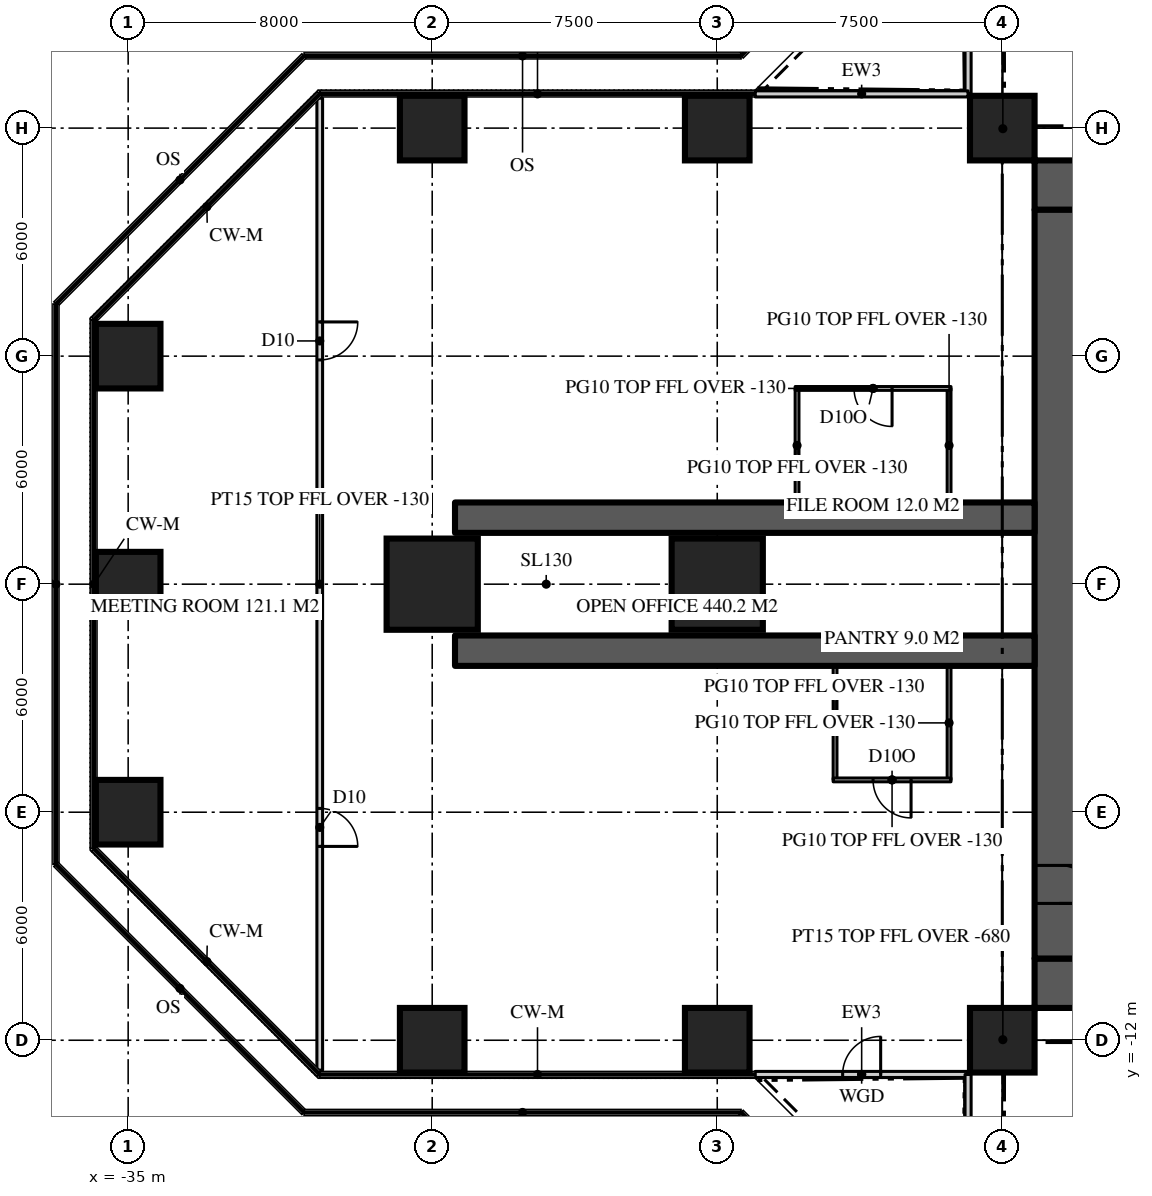
"""IFC4 building model, lengths in metres.
Left out: names, types, materials, properties, quantities, classifications, styles, units other than length and angle.
Written with IfcOpenShell. Run it as: python <this file> out.ifc"""

import sys

from ifc_helpers import new_model, si_unit, direction, frame, frame_2d, origin, origin_2d, place, context, subcontext, project, spatial, rectangle, extrude, element, fill, save


model = new_model("IFC4")
c1 = context("Model", 3, precision=1e-05, world=origin(), true_north=direction((0.0, 1.0)))
c2 = subcontext(c1, "Body", "Model", "MODEL_VIEW")
j1 = project(units=[si_unit("LENGTHUNIT", "METRE"), si_unit("PLANEANGLEUNIT", "RADIAN")], contexts=[c1])
p1 = place(None, origin())
s1 = spatial("IfcSite", under=j1, at=p1, CompositionType="ELEMENT")
p2 = place(p1, origin())
s2 = spatial("IfcBuilding", under=s1, at=p2, CompositionType="ELEMENT")
p3 = place(p2, frame((0.0, 0.0, 132.0)))
s3 = spatial("IfcBuildingStorey", under=s2, at=p3, CompositionType="ELEMENT", Elevation=132.0)
p4 = place(p3, frame((-11.15, 10.5, 0.0), z_axis=(0.0, 0.0, 1.0), x_axis=(1.0, 0.0, 0.0)))
e1 = element("IfcWall", 1, at=p4, inside=s3, PredefinedType="SHEAR", context=c2, shape_type="SweptSolid", body=[
    extrude(rectangle(XDim=22.3, YDim=1.3, at=frame_2d((11.15, 0.0))), origin(), (0.0, 0.0, 1.0), 3.9),
])
p5 = place(p4, frame((4.25, 0.0, 0.0)))
e2 = element("IfcOpeningElement", 2, at=p5, cuts=e1, PredefinedType="OPENING", context=c2, shape_type="SweptSolid", body=[
    extrude(rectangle(XDim=1.8, YDim=2.2, at=frame_2d((0.9, 1.1))), frame((0.0, 0.66, 0.0), z_axis=(0.0, -1.0, 0.0), x_axis=(1.0, 0.0, 0.0)), (0.0, 0.0, 1.0), 1.32),
])
p6 = place(p4, frame((16.25, 0.0, 0.0)))
e3 = element("IfcOpeningElement", 3, at=p6, cuts=e1, PredefinedType="OPENING", context=c2, shape_type="SweptSolid", body=[
    extrude(rectangle(XDim=1.8, YDim=2.2, at=frame_2d((0.9, 1.1))), frame((0.0, 0.66, 0.0), z_axis=(0.0, -1.0, 0.0), x_axis=(1.0, 0.0, 0.0)), (0.0, 0.0, 1.0), 1.32),
])
p7 = place(p3, frame((11.15, -10.5, 0.0), z_axis=(0.0, 0.0, 1.0), x_axis=(-1.0, 0.0, 0.0)))
e4 = element("IfcWall", 4, at=p7, inside=s3, PredefinedType="SHEAR", context=c2, shape_type="SweptSolid", body=[
    extrude(rectangle(XDim=22.3, YDim=1.3, at=frame_2d((11.15, 0.0))), origin(), (0.0, 0.0, 1.0), 3.9),
])
p8 = place(p7, frame((16.25, 0.0, 0.0)))
e5 = element("IfcOpeningElement", 5, at=p8, cuts=e4, PredefinedType="OPENING", context=c2, shape_type="SweptSolid", body=[
    extrude(rectangle(XDim=1.8, YDim=2.2, at=frame_2d((0.9, 1.1))), frame((0.0, 0.66, 0.0), z_axis=(0.0, -1.0, 0.0), x_axis=(1.0, 0.0, 0.0)), (0.0, 0.0, 1.0), 1.32),
])
p9 = place(p7, frame((4.25, 0.0, 0.0)))
e6 = element("IfcOpeningElement", 6, at=p9, cuts=e4, PredefinedType="OPENING", context=c2, shape_type="SweptSolid", body=[
    extrude(rectangle(XDim=1.8, YDim=2.2, at=frame_2d((0.9, 1.1))), frame((0.0, 0.66, 0.0), z_axis=(0.0, -1.0, 0.0), x_axis=(1.0, 0.0, 0.0)), (0.0, 0.0, 1.0), 1.32),
])
p10 = place(p3, frame((-10.5, 9.85, 0.0), z_axis=(0.0, 0.0, 1.0), x_axis=(0.0, -1.0, 0.0)))
e7 = element("IfcWall", 7, at=p10, inside=s3, PredefinedType="SHEAR", context=c2, shape_type="SweptSolid", body=[
    extrude(rectangle(XDim=19.7, YDim=1.3, at=frame_2d((9.85, 0.0))), origin(), (0.0, 0.0, 1.0), 3.9),
])
p11 = place(p10, frame((17.25, 0.0, 0.0)))
e8 = element("IfcOpeningElement", 8, at=p11, cuts=e7, PredefinedType="OPENING", context=c2, shape_type="SweptSolid", body=[
    extrude(rectangle(XDim=1.0, YDim=2.2, at=frame_2d((0.5, 1.1))), frame((0.0, 0.66, 0.0), z_axis=(0.0, -1.0, 0.0), x_axis=(1.0, 0.0, 0.0)), (0.0, 0.0, 1.0), 1.32),
])
for number, where, z_axis, x_axis in (
    (9, (-11.15, 1.75, 0.0), (0.0, 0.0, 1.0), (-1.0, 0.0, 0.0)),
    (10, (-11.15, -1.75, 0.0), (0.0, 0.0, 1.0), (-1.0, 0.0, 0.0)),
):
    element("IfcWall", number, at=place(p3, frame(where, z_axis=z_axis, x_axis=x_axis)), inside=s3, PredefinedType="SHEAR", context=c2, shape_type="SweptSolid", body=[
        extrude(rectangle(XDim=15.25, YDim=0.8, at=frame_2d((7.625, 0.0))), origin(), (0.0, 0.0, 1.0), 3.9),
    ])
for number, where, z_axis, x_axis in (
    (11, (-27.0, -12.0, 0.0), (0.0, 0.0, 1.0), (1.0, 0.0, 0.0)),
    (12, (-19.5, -12.0, 0.0), (0.0, 0.0, 1.0), (1.0, 0.0, 0.0)),
    (13, (-12.0, -12.0, 0.0), (0.0, 0.0, 1.0), (1.0, 0.0, 0.0)),
    (14, (-35.0, -6.0, 0.0), (0.0, 0.0, 1.0), (1.0, 0.0, 0.0)),
    (15, (-35.0, 0.0, 0.0), (0.0, 0.0, 1.0), (1.0, 0.0, 0.0)),
):
    element("IfcColumn", number, at=place(p3, frame(where, z_axis=z_axis, x_axis=x_axis)), inside=s3, PredefinedType="COLUMN", context=c2, shape_type="SweptSolid", body=[
        extrude(rectangle(XDim=1.7, YDim=1.7, at=origin_2d()), origin(), (0.0, 0.0, 1.0), 3.9),
    ])
for number, where, z_axis, x_axis in (
    (16, (-27.0, 0.0, 0.0), (0.0, 0.0, 1.0), (1.0, 0.0, 0.0)),
    (17, (-19.5, 0.0, 0.0), (0.0, 0.0, 1.0), (1.0, 0.0, 0.0)),
):
    element("IfcColumn", number, at=place(p3, frame(where, z_axis=z_axis, x_axis=x_axis)), inside=s3, PredefinedType="COLUMN", context=c2, shape_type="SweptSolid", body=[
        extrude(rectangle(XDim=2.4, YDim=2.4, at=origin_2d()), origin(), (0.0, 0.0, 1.0), 3.9),
    ])
for number, where, z_axis, x_axis in (
    (18, (-35.0, 6.0, 0.0), (0.0, 0.0, 1.0), (1.0, 0.0, 0.0)),
    (19, (-27.0, 12.0, 0.0), (0.0, 0.0, 1.0), (1.0, 0.0, 0.0)),
    (20, (-19.5, 12.0, 0.0), (0.0, 0.0, 1.0), (1.0, 0.0, 0.0)),
    (21, (-12.0, 12.0, 0.0), (0.0, 0.0, 1.0), (1.0, 0.0, 0.0)),
):
    element("IfcColumn", number, at=place(p3, frame(where, z_axis=z_axis, x_axis=x_axis)), inside=s3, PredefinedType="COLUMN", context=c2, shape_type="SweptSolid", body=[
        extrude(rectangle(XDim=1.7, YDim=1.7, at=origin_2d()), origin(), (0.0, 0.0, 1.0), 3.9),
    ])
p12 = place(p3, frame((-12.9, 18.5, 0.0), z_axis=(0.0, 0.0, 1.0), x_axis=(0.0, -1.0, 0.0)))
e22 = element("IfcWall", 22, at=p12, inside=s3, PredefinedType="SOLIDWALL", context=c2, shape_type="SweptSolid", body=[
    extrude(rectangle(XDim=5.6, YDim=0.16, at=frame_2d((2.8, 0.0))), origin(), (0.0, 0.0, 1.0), 3.77),
])
p13 = place(p12, frame((2.3, 0.0, 0.0)))
e23 = element("IfcOpeningElement", 23, at=p13, cuts=e22, PredefinedType="OPENING", context=c2, shape_type="SweptSolid", body=[
    extrude(rectangle(XDim=1.0, YDim=2.2, at=frame_2d((0.5, 1.1))), frame((0.0, 0.09, 0.0), z_axis=(0.0, -1.0, 0.0), x_axis=(1.0, 0.0, 0.0)), (0.0, 0.0, 1.0), 0.18),
])
p14 = place(p3, frame((-12.9, 12.9, 0.0), z_axis=(0.0, 0.0, 1.0), x_axis=(-1.0, 0.0, 0.0)))
e24 = element("IfcWall", 24, at=p14, inside=s3, PredefinedType="SOLIDWALL", context=c2, shape_type="SweptSolid", body=[
    extrude(rectangle(XDim=5.6, YDim=0.16, at=frame_2d((2.8, 0.0))), origin(), (0.0, 0.0, 1.0), 3.77),
])
p15 = place(p3, frame((-18.5, -12.9, 0.0), z_axis=(0.0, 0.0, 1.0), x_axis=(1.0, 0.0, 0.0)))
e25 = element("IfcWall", 25, at=p15, inside=s3, PredefinedType="SOLIDWALL", context=c2, shape_type="SweptSolid", body=[
    extrude(rectangle(XDim=5.6, YDim=0.16, at=frame_2d((2.8, 0.0))), origin(), (0.0, 0.0, 1.0), 3.77),
])
p16 = place(p15, frame((2.3, 0.0, 0.0)))
e26 = element("IfcOpeningElement", 26, at=p16, cuts=e25, PredefinedType="OPENING", context=c2, shape_type="SweptSolid", body=[
    extrude(rectangle(XDim=1.0, YDim=2.2, at=frame_2d((0.5, 1.1))), frame((0.0, 0.09, 0.0), z_axis=(0.0, -1.0, 0.0), x_axis=(1.0, 0.0, 0.0)), (0.0, 0.0, 1.0), 0.18),
])
p17 = place(p3, frame((-12.9, -12.9, 0.0), z_axis=(0.0, 0.0, 1.0), x_axis=(0.0, -1.0, 0.0)))
e27 = element("IfcWall", 27, at=p17, inside=s3, PredefinedType="SOLIDWALL", context=c2, shape_type="SweptSolid", body=[
    extrude(rectangle(XDim=5.6, YDim=0.16, at=frame_2d((2.8, 0.0))), origin(), (0.0, 0.0, 1.0), 3.77),
])
p18 = place(p3, frame((-29.959, 12.786, 0.0), z_axis=(0.0, 0.0, 1.0), x_axis=(0.0, -1.0, 0.0)))
e28 = element("IfcWall", 28, at=p18, inside=s3, PredefinedType="PARTITIONING", context=c2, shape_type="SweptSolid", body=[
    extrude(rectangle(XDim=25.573, YDim=0.15, at=frame_2d((12.786, 0.0))), origin(), (0.0, 0.0, 1.0), 3.77),
])
p19 = place(p18, frame((18.687, 0.0, 0.0)))
e29 = element("IfcOpeningElement", 29, at=p19, cuts=e28, PredefinedType="OPENING", context=c2, shape_type="SweptSolid", body=[
    extrude(rectangle(XDim=1.0, YDim=2.2, at=frame_2d((0.5, 1.1))), frame((0.0, 0.085, 0.0), z_axis=(0.0, -1.0, 0.0), x_axis=(1.0, 0.0, 0.0)), (0.0, 0.0, 1.0), 0.17),
])
p20 = place(p18, frame((5.886, 0.0, 0.0)))
e30 = element("IfcOpeningElement", 30, at=p20, cuts=e28, PredefinedType="OPENING", context=c2, shape_type="SweptSolid", body=[
    extrude(rectangle(XDim=1.0, YDim=2.2, at=frame_2d((0.5, 1.1))), frame((0.0, 0.085, 0.0), z_axis=(0.0, -1.0, 0.0), x_axis=(1.0, 0.0, 0.0)), (0.0, 0.0, 1.0), 0.17),
])
for number, where, z_axis, x_axis in (
    (31, (-13.4, -2.15, 0.0), (0.0, 0.0, 1.0), (0.0, -1.0, 0.0)),
    (32, (-16.4, -2.15, 0.0), (0.0, 0.0, 1.0), (0.0, -1.0, 0.0)),
):
    element("IfcWall", number, at=place(p3, frame(where, z_axis=z_axis, x_axis=x_axis)), inside=s3, PredefinedType="PARTITIONING", context=c2, shape_type="SweptSolid", body=[
        extrude(rectangle(XDim=3.0, YDim=0.1, at=frame_2d((1.5, 0.0))), origin(), (0.0, 0.0, 1.0), 3.77),
    ])
p21 = place(p3, frame((-13.35, -5.15, 0.0), z_axis=(0.0, 0.0, 1.0), x_axis=(-1.0, 0.0, 0.0)))
e33 = element("IfcWall", 33, at=p21, inside=s3, PredefinedType="PARTITIONING", context=c2, shape_type="SweptSolid", body=[
    extrude(rectangle(XDim=3.1, YDim=0.1, at=frame_2d((1.55, 0.0))), origin(), (0.0, 0.0, 1.0), 3.77),
])
p22 = place(p21, frame((1.05, 0.0, 0.0)))
e34 = element("IfcOpeningElement", 34, at=p22, cuts=e33, PredefinedType="OPENING", context=c2, shape_type="SweptSolid", body=[
    extrude(rectangle(XDim=1.0, YDim=2.2, at=frame_2d((0.5, 1.1))), frame((0.0, 0.06, 0.0), z_axis=(0.0, -1.0, 0.0), x_axis=(1.0, 0.0, 0.0)), (0.0, 0.0, 1.0), 0.12),
])
for number, where, z_axis, x_axis in (
    (35, (-13.4, 2.15, 0.0), (0.0, 0.0, 1.0), (0.0, 1.0, 0.0)),
    (36, (-17.4, 2.15, 0.0), (0.0, 0.0, 1.0), (0.0, 1.0, 0.0)),
):
    element("IfcWall", number, at=place(p3, frame(where, z_axis=z_axis, x_axis=x_axis)), inside=s3, PredefinedType="PARTITIONING", context=c2, shape_type="SweptSolid", body=[
        extrude(rectangle(XDim=3.0, YDim=0.1, at=frame_2d((1.5, 0.0))), origin(), (0.0, 0.0, 1.0), 3.77),
    ])
p23 = place(p3, frame((-13.35, 5.15, 0.0), z_axis=(0.0, 0.0, 1.0), x_axis=(-1.0, 0.0, 0.0)))
e37 = element("IfcWall", 37, at=p23, inside=s3, PredefinedType="PARTITIONING", context=c2, shape_type="SweptSolid", body=[
    extrude(rectangle(XDim=4.1, YDim=0.1, at=frame_2d((2.05, 0.0))), origin(), (0.0, 0.0, 1.0), 3.77),
])
p24 = place(p23, frame((1.55, 0.0, 0.0)))
e38 = element("IfcOpeningElement", 38, at=p24, cuts=e37, PredefinedType="OPENING", context=c2, shape_type="SweptSolid", body=[
    extrude(rectangle(XDim=1.0, YDim=2.2, at=frame_2d((0.5, 1.1))), frame((0.0, 0.06, 0.0), z_axis=(0.0, -1.0, 0.0), x_axis=(1.0, 0.0, 0.0)), (0.0, 0.0, 1.0), 0.12),
])
for number, where, z_axis, x_axis in (
    (39, (-11.15, 11.15, 0.0), (0.0, 0.0, 1.0), (-0.707, 0.707, 0.0)),
    (40, (-11.15, -11.15, 0.0), (0.0, 0.0, 1.0), (-0.707, -0.707, 0.0)),
):
    element("IfcWall", number, at=place(p3, frame(where, z_axis=z_axis, x_axis=x_axis)), inside=s3, PredefinedType="PARTITIONING", context=c2, shape_type="SweptSolid", body=[
        extrude(rectangle(XDim=2.362, YDim=0.15, at=frame_2d((1.181, 0.0))), origin(), (0.0, 0.0, 1.0), 3.22),
    ])
p25 = place(p16, origin())
e41 = element("IfcDoor", 41, at=p25, inside=s3, OperationType="SINGLE_SWING_RIGHT", PredefinedType="DOOR", context=c2, shape_type="SweptSolid", body=[
    extrude(rectangle(XDim=1.0, YDim=2.2, at=frame_2d((0.5, 1.1))), frame((0.0, 0.025, 0.0), z_axis=(0.0, -1.0, 0.0), x_axis=(1.0, 0.0, 0.0)), (0.0, 0.0, 1.0), 0.05),
])
fill(e26, e41)
p26 = place(p11, origin())
e42 = element("IfcDoor", 42, at=p26, inside=s3, OperationType="SINGLE_SWING_RIGHT", PredefinedType="DOOR", context=c2, shape_type="SweptSolid", body=[
    extrude(rectangle(XDim=1.0, YDim=2.2, at=frame_2d((0.5, 1.1))), frame((0.0, 0.025, 0.0), z_axis=(0.0, -1.0, 0.0), x_axis=(1.0, 0.0, 0.0)), (0.0, 0.0, 1.0), 0.05),
])
fill(e8, e42)
p27 = place(p19, origin())
e43 = element("IfcDoor", 43, at=p27, inside=s3, OperationType="SINGLE_SWING_RIGHT", PredefinedType="DOOR", context=c2, shape_type="SweptSolid", body=[
    extrude(rectangle(XDim=1.0, YDim=2.2, at=frame_2d((0.5, 1.1))), frame((0.0, 0.025, 0.0), z_axis=(0.0, -1.0, 0.0), x_axis=(1.0, 0.0, 0.0)), (0.0, 0.0, 1.0), 0.05),
])
fill(e29, e43)
p28 = place(p20, origin())
e44 = element("IfcDoor", 44, at=p28, inside=s3, OperationType="SINGLE_SWING_LEFT", PredefinedType="DOOR", context=c2, shape_type="SweptSolid", body=[
    extrude(rectangle(XDim=1.0, YDim=2.2, at=frame_2d((0.5, 1.1))), frame((0.0, 0.025, 0.0), z_axis=(0.0, -1.0, 0.0), x_axis=(1.0, 0.0, 0.0)), (0.0, 0.0, 1.0), 0.05),
])
fill(e30, e44)
p29 = place(p22, origin())
e45 = element("IfcDoor", 45, at=p29, inside=s3, OperationType="SINGLE_SWING_LEFT", PredefinedType="DOOR", context=c2, shape_type="SweptSolid", body=[
    extrude(rectangle(XDim=1.0, YDim=2.2, at=frame_2d((0.5, 1.1))), frame((0.0, 0.025, 0.0), z_axis=(0.0, -1.0, 0.0), x_axis=(1.0, 0.0, 0.0)), (0.0, 0.0, 1.0), 0.05),
])
fill(e34, e45)
p30 = place(p24, origin())
e46 = element("IfcDoor", 46, at=p30, inside=s3, OperationType="SINGLE_SWING_LEFT", PredefinedType="DOOR", context=c2, shape_type="SweptSolid", body=[
    extrude(rectangle(XDim=1.0, YDim=2.2, at=frame_2d((0.5, 1.1))), frame((0.0, 0.025, 0.0), z_axis=(0.0, -1.0, 0.0), x_axis=(1.0, 0.0, 0.0)), (0.0, 0.0, 1.0), 0.05),
])
fill(e38, e46)
save(model, sys.argv[1])
